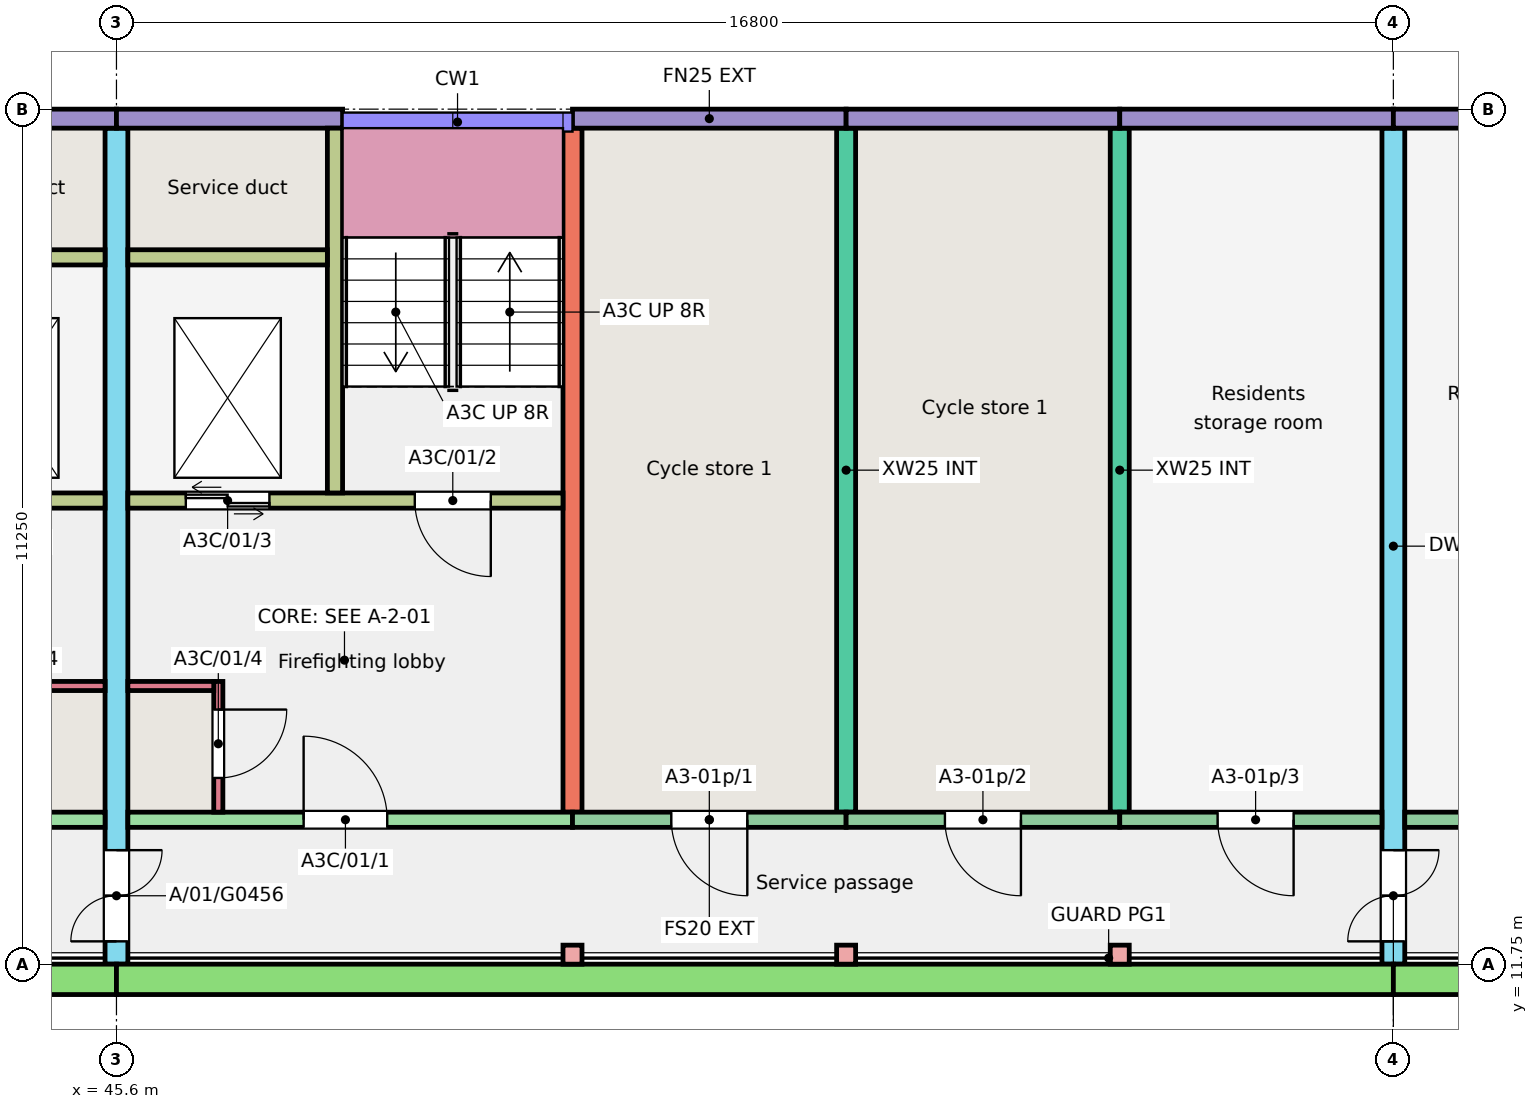
"""IFC4 building model, lengths in metres.
Left out: names, types, materials, properties, quantities, classifications, styles, units other than length and angle.
Written with IfcOpenShell. Run it as: python <this file> out.ifc"""

import sys

from ifc_helpers import new_model, si_unit, direction, frame, frame_2d, origin, origin_2d, place, context, subcontext, project, spatial, rectangle, extrude, element, fill, save


model = new_model("IFC4")
c1 = context("Model", 3, precision=1e-05, world=origin(), true_north=direction((0.0, 1.0)))
c2 = subcontext(c1, "Body", "Model", "MODEL_VIEW")
j1 = project(units=[si_unit("LENGTHUNIT", "METRE"), si_unit("PLANEANGLEUNIT", "RADIAN")], contexts=[c1])
p1 = place(None, origin())
s1 = spatial("IfcSite", under=j1, at=p1, CompositionType="ELEMENT")
p2 = place(p1, origin())
s2 = spatial("IfcBuilding", under=s1, at=p2, CompositionType="ELEMENT")
p3 = place(p2, frame((0.0, 0.0, 3.0)))
s3 = spatial("IfcBuildingStorey", under=s2, at=p3, CompositionType="ELEMENT", Elevation=3.0)
p4 = place(p3, frame((45.6, 11.75, 0.0), z_axis=(0.0, 0.0, 1.0), x_axis=(0.0, 1.0, 0.0)))
e1 = element("IfcWall", 1, at=p4, inside=s3, PredefinedType="SHEAR", context=c2, shape_type="SweptSolid", body=[
    extrude(rectangle(XDim=11.0, YDim=0.3, at=frame_2d((5.5, 0.0))), origin(), (0.0, 0.0, 1.0), 3.0),
])
p5 = place(p4, frame((0.3, 0.0, 0.0)))
e2 = element("IfcOpeningElement", 2, at=p5, cuts=e1, PredefinedType="OPENING", context=c2, shape_type="SweptSolid", body=[
    extrude(rectangle(XDim=1.2, YDim=2.1, at=frame_2d((0.6, 1.05))), frame((0.0, 0.16, 0.0), z_axis=(0.0, -1.0, 0.0), x_axis=(1.0, 0.0, 0.0)), (0.0, 0.0, 1.0), 0.32),
])
for number, where, z_axis, x_axis in (
    (3, (51.6, 13.75, 0.0), (0.0, 0.0, 1.0), (0.0, 1.0, 0.0)),
    (4, (55.2, 13.75, 0.0), (0.0, 0.0, 1.0), (0.0, 1.0, 0.0)),
    (5, (58.8, 13.75, 0.0), (0.0, 0.0, 1.0), (0.0, 1.0, 0.0)),
):
    element("IfcWall", number, at=place(p3, frame(where, z_axis=z_axis, x_axis=x_axis)), inside=s3, PredefinedType="SHEAR", context=c2, shape_type="SweptSolid", body=[
        extrude(rectangle(XDim=9.0, YDim=0.25, at=frame_2d((4.5, 0.0))), origin(), (0.0, 0.0, 1.0), 3.0),
    ])
p6 = place(p3, frame((62.4, 11.75, 0.0), z_axis=(0.0, 0.0, 1.0), x_axis=(0.0, 1.0, 0.0)))
e6 = element("IfcWall", 6, at=p6, inside=s3, PredefinedType="SHEAR", context=c2, shape_type="SweptSolid", body=[
    extrude(rectangle(XDim=11.0, YDim=0.3, at=frame_2d((5.5, 0.0))), origin(), (0.0, 0.0, 1.0), 3.0),
])
p7 = place(p6, frame((0.3, 0.0, 0.0)))
e7 = element("IfcOpeningElement", 7, at=p7, cuts=e6, PredefinedType="OPENING", context=c2, shape_type="SweptSolid", body=[
    extrude(rectangle(XDim=1.2, YDim=2.1, at=frame_2d((0.6, 1.05))), frame((0.0, 0.16, 0.0), z_axis=(0.0, -1.0, 0.0), x_axis=(1.0, 0.0, 0.0)), (0.0, 0.0, 1.0), 0.32),
])
p8 = place(p3, frame((42.625, 22.875, 0.0), z_axis=(0.0, 0.0, 1.0), x_axis=(1.0, 0.0, 0.0)))
e8 = element("IfcWall", 8, at=p8, inside=s3, PredefinedType="SOLIDWALL", context=c2, shape_type="SweptSolid", body=[
    extrude(rectangle(XDim=2.975, YDim=0.25, at=frame_2d((1.488, 0.0))), origin(), (0.0, 0.0, 1.0), 3.0),
])
p9 = place(p3, frame((39.6, 13.65, 0.0), z_axis=(0.0, 0.0, 1.0), x_axis=(1.0, 0.0, 0.0)))
e9 = element("IfcWall", 9, at=p9, inside=s3, PredefinedType="SHEAR", context=c2, shape_type="SweptSolid", body=[
    extrude(rectangle(XDim=5.85, YDim=0.2, at=frame_2d((2.925, 0.0))), origin(), (0.0, 0.0, 1.0), 3.0),
])
p10 = place(p9, frame((2.438, 0.0, 0.0)))
e10 = element("IfcOpeningElement", 10, at=p10, cuts=e9, PredefinedType="OPENING", context=c2, shape_type="SweptSolid", body=[
    extrude(rectangle(XDim=1.1, YDim=2.1, at=frame_2d((0.55, 1.05))), frame((0.0, 0.11, 0.0), z_axis=(0.0, -1.0, 0.0), x_axis=(1.0, 0.0, 0.0)), (0.0, 0.0, 1.0), 0.22),
])
p11 = place(p3, frame((39.725, 17.85, 0.0), z_axis=(0.0, 0.0, 1.0), x_axis=(1.0, 0.0, 0.0)))
e11 = element("IfcWall", 11, at=p11, inside=s3, PredefinedType="SHEAR", context=c2, shape_type="SweptSolid", body=[
    extrude(rectangle(XDim=5.725, YDim=0.2, at=frame_2d((2.862, 0.0))), origin(), (0.0, 0.0, 1.0), 3.0),
])
p12 = place(p11, frame((0.95, 0.0, 0.0)))
e12 = element("IfcOpeningElement", 12, at=p12, cuts=e11, PredefinedType="OPENING", context=c2, shape_type="SweptSolid", body=[
    extrude(rectangle(XDim=1.0, YDim=2.1, at=frame_2d((0.5, 1.05))), frame((0.0, 0.11, 0.0), z_axis=(0.0, -1.0, 0.0), x_axis=(1.0, 0.0, 0.0)), (0.0, 0.0, 1.0), 0.22),
])
p13 = place(p11, frame((3.863, 0.0, 0.0)))
e13 = element("IfcOpeningElement", 13, at=p13, cuts=e11, PredefinedType="OPENING", context=c2, shape_type="SweptSolid", body=[
    extrude(rectangle(XDim=1.1, YDim=2.1, at=frame_2d((0.55, 1.05))), frame((0.0, 0.11, 0.0), z_axis=(0.0, -1.0, 0.0), x_axis=(1.0, 0.0, 0.0)), (0.0, 0.0, 1.0), 0.22),
])
p14 = place(p3, frame((42.825, 21.05, 0.0), z_axis=(0.0, 0.0, 1.0), x_axis=(1.0, 0.0, 0.0)))
e14 = element("IfcWall", 14, at=p14, inside=s3, PredefinedType="SHEAR", context=c2, shape_type="SweptSolid", body=[
    extrude(rectangle(XDim=2.625, YDim=0.2, at=frame_2d((1.312, 0.0))), origin(), (0.0, 0.0, 1.0), 3.0),
])
p15 = place(p3, frame((44.32, 15.41, 0.0), z_axis=(0.0, 0.0, 1.0), x_axis=(1.0, 0.0, 0.0)))
e15 = element("IfcWall", 15, at=p15, inside=s3, PredefinedType="SHEAR", context=c2, shape_type="SweptSolid", body=[
    extrude(rectangle(XDim=1.13, YDim=0.12, at=frame_2d((0.565, 0.0))), origin(), (0.0, 0.0, 1.0), 3.0),
])
p16 = place(p3, frame((45.6, 22.875, 0.0), z_axis=(0.0, 0.0, 1.0), x_axis=(1.0, 0.0, 0.0)))
e16 = element("IfcWall", 16, at=p16, inside=s3, PredefinedType="SOLIDWALL", context=c2, shape_type="SweptSolid", body=[
    extrude(rectangle(XDim=2.975, YDim=0.25, at=frame_2d((1.487, 0.0))), origin(), (0.0, 0.0, 1.0), 3.0),
])
p17 = place(p3, frame((45.75, 13.65, 0.0), z_axis=(0.0, 0.0, 1.0), x_axis=(1.0, 0.0, 0.0)))
e17 = element("IfcWall", 17, at=p17, inside=s3, PredefinedType="SHEAR", context=c2, shape_type="SweptSolid", body=[
    extrude(rectangle(XDim=5.85, YDim=0.2, at=frame_2d((2.925, 0.0))), origin(), (0.0, 0.0, 1.0), 3.0),
])
p18 = place(p17, frame((2.312, 0.0, 0.0)))
e18 = element("IfcOpeningElement", 18, at=p18, cuts=e17, PredefinedType="OPENING", context=c2, shape_type="SweptSolid", body=[
    extrude(rectangle(XDim=1.1, YDim=2.1, at=frame_2d((0.55, 1.05))), frame((0.0, 0.11, 0.0), z_axis=(0.0, -1.0, 0.0), x_axis=(1.0, 0.0, 0.0)), (0.0, 0.0, 1.0), 0.22),
])
p19 = place(p3, frame((45.75, 17.85, 0.0), z_axis=(0.0, 0.0, 1.0), x_axis=(1.0, 0.0, 0.0)))
e19 = element("IfcWall", 19, at=p19, inside=s3, PredefinedType="SHEAR", context=c2, shape_type="SweptSolid", body=[
    extrude(rectangle(XDim=5.725, YDim=0.2, at=frame_2d((2.863, 0.0))), origin(), (0.0, 0.0, 1.0), 3.0),
])
p20 = place(p19, frame((3.775, 0.0, 0.0)))
e20 = element("IfcOpeningElement", 20, at=p20, cuts=e19, PredefinedType="OPENING", context=c2, shape_type="SweptSolid", body=[
    extrude(rectangle(XDim=1.0, YDim=2.1, at=frame_2d((0.5, 1.05))), frame((0.0, 0.11, 0.0), z_axis=(0.0, -1.0, 0.0), x_axis=(1.0, 0.0, 0.0)), (0.0, 0.0, 1.0), 0.22),
])
p21 = place(p19, frame((0.762, 0.0, 0.0)))
e21 = element("IfcOpeningElement", 21, at=p21, cuts=e19, PredefinedType="OPENING", context=c2, shape_type="SweptSolid", body=[
    extrude(rectangle(XDim=1.1, YDim=2.1, at=frame_2d((0.55, 1.05))), frame((0.0, 0.11, 0.0), z_axis=(0.0, -1.0, 0.0), x_axis=(1.0, 0.0, 0.0)), (0.0, 0.0, 1.0), 0.22),
])
p22 = place(p3, frame((48.475, 17.95, 0.0), z_axis=(0.0, 0.0, 1.0), x_axis=(0.0, 1.0, 0.0)))
e22 = element("IfcWall", 22, at=p22, inside=s3, PredefinedType="SHEAR", context=c2, shape_type="SweptSolid", body=[
    extrude(rectangle(XDim=4.8, YDim=0.2, at=frame_2d((2.4, 0.0))), origin(), (0.0, 0.0, 1.0), 3.0),
])
p23 = place(p3, frame((45.75, 21.05, 0.0), z_axis=(0.0, 0.0, 1.0), x_axis=(1.0, 0.0, 0.0)))
e23 = element("IfcWall", 23, at=p23, inside=s3, PredefinedType="SHEAR", context=c2, shape_type="SweptSolid", body=[
    extrude(rectangle(XDim=2.625, YDim=0.2, at=frame_2d((1.312, 0.0))), origin(), (0.0, 0.0, 1.0), 3.0),
])
p24 = place(p3, frame((46.94, 13.75, 0.0), z_axis=(0.0, 0.0, 1.0), x_axis=(0.0, 1.0, 0.0)))
e24 = element("IfcWall", 24, at=p24, inside=s3, PredefinedType="SHEAR", context=c2, shape_type="SweptSolid", body=[
    extrude(rectangle(XDim=1.72, YDim=0.12, at=frame_2d((0.86, 0.0))), origin(), (0.0, 0.0, 1.0), 3.0),
])
p25 = place(p24, frame((0.45, 0.0, 0.0)))
e25 = element("IfcOpeningElement", 25, at=p25, cuts=e24, PredefinedType="OPENING", context=c2, shape_type="SweptSolid", body=[
    extrude(rectangle(XDim=0.9, YDim=2.1, at=frame_2d((0.45, 1.05))), frame((0.0, 0.07, 0.0), z_axis=(0.0, -1.0, 0.0), x_axis=(1.0, 0.0, 0.0)), (0.0, 0.0, 1.0), 0.14),
])
p26 = place(p3, frame((45.75, 15.41, 0.0), z_axis=(0.0, 0.0, 1.0), x_axis=(1.0, 0.0, 0.0)))
e26 = element("IfcWall", 26, at=p26, inside=s3, PredefinedType="SHEAR", context=c2, shape_type="SweptSolid", body=[
    extrude(rectangle(XDim=1.13, YDim=0.12, at=frame_2d((0.565, 0.0))), origin(), (0.0, 0.0, 1.0), 3.0),
])
p27 = place(p3, frame((51.6, 22.875, 0.0), z_axis=(0.0, 0.0, 1.0), x_axis=(1.0, 0.0, 0.0)))
e27 = element("IfcWall", 27, at=p27, inside=s3, PredefinedType="SOLIDWALL", context=c2, shape_type="SweptSolid", body=[
    extrude(rectangle(XDim=3.6, YDim=0.25, at=frame_2d((1.8, 0.0))), origin(), (0.0, 0.0, 1.0), 3.0),
])
p28 = place(p3, frame((51.6, 13.65, 0.0), z_axis=(0.0, 0.0, 1.0), x_axis=(1.0, 0.0, 0.0)))
e28 = element("IfcWall", 28, at=p28, inside=s3, PredefinedType="SOLIDWALL", context=c2, shape_type="SweptSolid", body=[
    extrude(rectangle(XDim=3.6, YDim=0.2, at=frame_2d((1.8, 0.0))), origin(), (0.0, 0.0, 1.0), 3.0),
])
p29 = place(p28, frame((1.3, 0.0, 0.0)))
e29 = element("IfcOpeningElement", 29, at=p29, cuts=e28, PredefinedType="OPENING", context=c2, shape_type="SweptSolid", body=[
    extrude(rectangle(XDim=1.0, YDim=2.1, at=frame_2d((0.5, 1.05))), frame((0.0, 0.11, 0.0), z_axis=(0.0, -1.0, 0.0), x_axis=(1.0, 0.0, 0.0)), (0.0, 0.0, 1.0), 0.22),
])
p30 = place(p3, frame((55.2, 22.875, 0.0), z_axis=(0.0, 0.0, 1.0), x_axis=(1.0, 0.0, 0.0)))
e30 = element("IfcWall", 30, at=p30, inside=s3, PredefinedType="SOLIDWALL", context=c2, shape_type="SweptSolid", body=[
    extrude(rectangle(XDim=3.6, YDim=0.25, at=frame_2d((1.8, 0.0))), origin(), (0.0, 0.0, 1.0), 3.0),
])
p31 = place(p3, frame((55.2, 13.65, 0.0), z_axis=(0.0, 0.0, 1.0), x_axis=(1.0, 0.0, 0.0)))
e31 = element("IfcWall", 31, at=p31, inside=s3, PredefinedType="SOLIDWALL", context=c2, shape_type="SweptSolid", body=[
    extrude(rectangle(XDim=3.6, YDim=0.2, at=frame_2d((1.8, 0.0))), origin(), (0.0, 0.0, 1.0), 3.0),
])
p32 = place(p31, frame((1.3, 0.0, 0.0)))
e32 = element("IfcOpeningElement", 32, at=p32, cuts=e31, PredefinedType="OPENING", context=c2, shape_type="SweptSolid", body=[
    extrude(rectangle(XDim=1.0, YDim=2.1, at=frame_2d((0.5, 1.05))), frame((0.0, 0.11, 0.0), z_axis=(0.0, -1.0, 0.0), x_axis=(1.0, 0.0, 0.0)), (0.0, 0.0, 1.0), 0.22),
])
p33 = place(p3, frame((58.8, 22.875, 0.0), z_axis=(0.0, 0.0, 1.0), x_axis=(1.0, 0.0, 0.0)))
e33 = element("IfcWall", 33, at=p33, inside=s3, PredefinedType="SOLIDWALL", context=c2, shape_type="SweptSolid", body=[
    extrude(rectangle(XDim=3.6, YDim=0.25, at=frame_2d((1.8, 0.0))), origin(), (0.0, 0.0, 1.0), 3.0),
])
p34 = place(p3, frame((58.8, 13.65, 0.0), z_axis=(0.0, 0.0, 1.0), x_axis=(1.0, 0.0, 0.0)))
e34 = element("IfcWall", 34, at=p34, inside=s3, PredefinedType="SOLIDWALL", context=c2, shape_type="SweptSolid", body=[
    extrude(rectangle(XDim=3.45, YDim=0.2, at=frame_2d((1.725, 0.0))), origin(), (0.0, 0.0, 1.0), 3.0),
])
p35 = place(p34, frame((1.288, 0.0, 0.0)))
e35 = element("IfcOpeningElement", 35, at=p35, cuts=e34, PredefinedType="OPENING", context=c2, shape_type="SweptSolid", body=[
    extrude(rectangle(XDim=1.0, YDim=2.1, at=frame_2d((0.5, 1.05))), frame((0.0, 0.11, 0.0), z_axis=(0.0, -1.0, 0.0), x_axis=(1.0, 0.0, 0.0)), (0.0, 0.0, 1.0), 0.22),
])
p36 = place(p3, frame((62.4, 22.875, 0.0), z_axis=(0.0, 0.0, 1.0), x_axis=(1.0, 0.0, 0.0)))
e36 = element("IfcWall", 36, at=p36, inside=s3, PredefinedType="SOLIDWALL", context=c2, shape_type="SweptSolid", body=[
    extrude(rectangle(XDim=3.6, YDim=0.25, at=frame_2d((1.8, 0.0))), origin(), (0.0, 0.0, 1.0), 3.0),
])
p37 = place(p3, frame((62.55, 13.65, 0.0), z_axis=(0.0, 0.0, 1.0), x_axis=(1.0, 0.0, 0.0)))
e37 = element("IfcWall", 37, at=p37, inside=s3, PredefinedType="SOLIDWALL", context=c2, shape_type="SweptSolid", body=[
    extrude(rectangle(XDim=3.45, YDim=0.2, at=frame_2d((1.725, 0.0))), origin(), (0.0, 0.0, 1.0), 3.0),
])
p38 = place(p37, frame((1.163, 0.0, 0.0)))
e38 = element("IfcOpeningElement", 38, at=p38, cuts=e37, PredefinedType="OPENING", context=c2, shape_type="SweptSolid", body=[
    extrude(rectangle(XDim=1.0, YDim=2.1, at=frame_2d((0.5, 1.05))), frame((0.0, 0.11, 0.0), z_axis=(0.0, -1.0, 0.0), x_axis=(1.0, 0.0, 0.0)), (0.0, 0.0, 1.0), 0.22),
])
for number, where, z_axis, x_axis in (
    (39, (51.6, 11.875, 0.0), (0.0, 0.0, 1.0), (1.0, 0.0, 0.0)),
    (40, (55.2, 11.875, 0.0), (0.0, 0.0, 1.0), (1.0, 0.0, 0.0)),
    (41, (58.8, 11.875, 0.0), (0.0, 0.0, 1.0), (1.0, 0.0, 0.0)),
):
    element("IfcColumn", number, at=place(p3, frame(where, z_axis=z_axis, x_axis=x_axis)), inside=s3, PredefinedType="COLUMN", context=c2, shape_type="SweptSolid", body=[
        extrude(rectangle(XDim=0.25, YDim=0.25, at=origin_2d()), origin(), (0.0, 0.0, 1.0), 3.0),
    ])
p39 = place(p3, frame((28.8, 11.55, 0.0), z_axis=(0.0, 0.0, 1.0), x_axis=(1.0, 0.0, 0.0)))
e42 = element("IfcWall", 42, at=p39, inside=s3, PredefinedType="SOLIDWALL", context=c2, shape_type="SweptSolid", body=[
    extrude(rectangle(XDim=16.8, YDim=0.4, at=frame_2d((8.4, 0.0))), origin(), (0.0, 0.0, 1.0), 2.85),
])
p40 = place(p3, frame((45.6, 11.55, 0.0), z_axis=(0.0, 0.0, 1.0), x_axis=(1.0, 0.0, 0.0)))
e43 = element("IfcWall", 43, at=p40, inside=s3, PredefinedType="SOLIDWALL", context=c2, shape_type="SweptSolid", body=[
    extrude(rectangle(XDim=16.8, YDim=0.4, at=frame_2d((8.4, 0.0))), origin(), (0.0, 0.0, 1.0), 2.85),
])
p41 = place(p3, frame((62.4, 11.55, 0.0), z_axis=(0.0, 0.0, 1.0), x_axis=(1.0, 0.0, 0.0)))
e44 = element("IfcWall", 44, at=p41, inside=s3, PredefinedType="SOLIDWALL", context=c2, shape_type="SweptSolid", body=[
    extrude(rectangle(XDim=16.8, YDim=0.4, at=frame_2d((8.4, 0.0))), origin(), (0.0, 0.0, 1.0), 2.85),
])
p42 = place(p29, origin())
e45 = element("IfcDoor", 45, at=p42, inside=s3, OperationType="SINGLE_SWING_RIGHT", PredefinedType="DOOR", context=c2, shape_type="SweptSolid", body=[
    extrude(rectangle(XDim=1.0, YDim=2.1, at=frame_2d((0.5, 1.05))), frame((0.0, 0.025, 0.0), z_axis=(0.0, -1.0, 0.0), x_axis=(1.0, 0.0, 0.0)), (0.0, 0.0, 1.0), 0.05),
])
fill(e29, e45)
p43 = place(p32, origin())
e46 = element("IfcDoor", 46, at=p43, inside=s3, OperationType="SINGLE_SWING_RIGHT", PredefinedType="DOOR", context=c2, shape_type="SweptSolid", body=[
    extrude(rectangle(XDim=1.0, YDim=2.1, at=frame_2d((0.5, 1.05))), frame((0.0, 0.025, 0.0), z_axis=(0.0, -1.0, 0.0), x_axis=(1.0, 0.0, 0.0)), (0.0, 0.0, 1.0), 0.05),
])
fill(e32, e46)
p44 = place(p35, origin())
e47 = element("IfcDoor", 47, at=p44, inside=s3, OperationType="SINGLE_SWING_RIGHT", PredefinedType="DOOR", context=c2, shape_type="SweptSolid", body=[
    extrude(rectangle(XDim=1.0, YDim=2.1, at=frame_2d((0.5, 1.05))), frame((0.0, 0.025, 0.0), z_axis=(0.0, -1.0, 0.0), x_axis=(1.0, 0.0, 0.0)), (0.0, 0.0, 1.0), 0.05),
])
fill(e35, e47)
p45 = place(p18, origin())
e48 = element("IfcDoor", 48, at=p45, inside=s3, OperationType="SINGLE_SWING_LEFT", PredefinedType="DOOR", context=c2, shape_type="SweptSolid", body=[
    extrude(rectangle(XDim=1.1, YDim=2.1, at=frame_2d((0.55, 1.05))), frame((0.0, 0.025, 0.0), z_axis=(0.0, -1.0, 0.0), x_axis=(1.0, 0.0, 0.0)), (0.0, 0.0, 1.0), 0.05),
])
fill(e18, e48)
p46 = place(p20, origin())
e49 = element("IfcDoor", 49, at=p46, inside=s3, OperationType="SINGLE_SWING_RIGHT", PredefinedType="DOOR", context=c2, shape_type="SweptSolid", body=[
    extrude(rectangle(XDim=1.0, YDim=2.1, at=frame_2d((0.5, 1.05))), frame((0.0, 0.025, 0.0), z_axis=(0.0, -1.0, 0.0), x_axis=(1.0, 0.0, 0.0)), (0.0, 0.0, 1.0), 0.05),
])
fill(e20, e49)
p47 = place(p21, origin())
e50 = element("IfcDoor", 50, at=p47, inside=s3, OperationType="DOUBLE_DOOR_SLIDING", PredefinedType="DOOR", context=c2, shape_type="SweptSolid", body=[
    extrude(rectangle(XDim=1.1, YDim=2.1, at=frame_2d((0.55, 1.05))), frame((0.0, 0.025, 0.0), z_axis=(0.0, -1.0, 0.0), x_axis=(1.0, 0.0, 0.0)), (0.0, 0.0, 1.0), 0.05),
])
fill(e21, e50)
p48 = place(p25, origin())
e51 = element("IfcDoor", 51, at=p48, inside=s3, OperationType="SINGLE_SWING_RIGHT", PredefinedType="DOOR", context=c2, shape_type="SweptSolid", body=[
    extrude(rectangle(XDim=0.9, YDim=2.1, at=frame_2d((0.45, 1.05))), frame((0.0, 0.025, 0.0), z_axis=(0.0, -1.0, 0.0), x_axis=(1.0, 0.0, 0.0)), (0.0, 0.0, 1.0), 0.05),
])
fill(e25, e51)
p49 = place(p5, origin())
e52 = element("IfcDoor", 52, at=p49, inside=s3, OperationType="DOUBLE_DOOR_SINGLE_SWING", PredefinedType="DOOR", context=c2, shape_type="SweptSolid", body=[
    extrude(rectangle(XDim=1.2, YDim=2.1, at=frame_2d((0.6, 1.05))), frame((0.0, 0.025, 0.0), z_axis=(0.0, -1.0, 0.0), x_axis=(1.0, 0.0, 0.0)), (0.0, 0.0, 1.0), 0.05),
])
fill(e2, e52)
p50 = place(p7, origin())
e53 = element("IfcDoor", 53, at=p50, inside=s3, OperationType="DOUBLE_DOOR_SINGLE_SWING", PredefinedType="DOOR", context=c2, shape_type="SweptSolid", body=[
    extrude(rectangle(XDim=1.2, YDim=2.1, at=frame_2d((0.6, 1.05))), frame((0.0, 0.025, 0.0), z_axis=(0.0, -1.0, 0.0), x_axis=(1.0, 0.0, 0.0)), (0.0, 0.0, 1.0), 0.05),
])
fill(e7, e53)
save(model, sys.argv[1])
